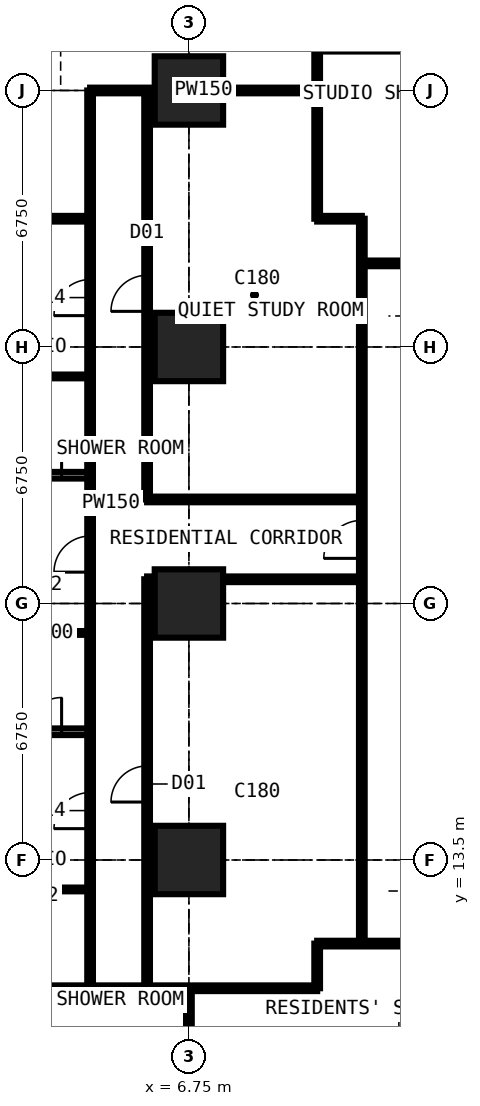
"""IFC4 building model, lengths in metres.
Left out: names, types, materials, properties, quantities, classifications, styles, units other than length and angle.
Written with IfcOpenShell. Run it as: python <this file> out.ifc"""

import sys

from ifc_helpers import new_model, si_unit, direction, frame, frame_2d, origin, origin_2d, place, context, subcontext, project, spatial, rectangle, extrude, element, fill, save


model = new_model("IFC4")
c1 = context("Model", 3, precision=1e-05, world=origin(), true_north=direction((0.0, 1.0)))
c2 = subcontext(c1, "Body", "Model", "MODEL_VIEW")
j1 = project(units=[si_unit("LENGTHUNIT", "METRE"), si_unit("PLANEANGLEUNIT", "RADIAN")], contexts=[c1])
p1 = place(None, origin())
s1 = spatial("IfcSite", under=j1, at=p1, CompositionType="ELEMENT")
p2 = place(p1, origin())
s2 = spatial("IfcBuilding", under=s1, at=p2, CompositionType="ELEMENT")
p3 = place(p2, frame((0.0, 0.0, 64.8)))
s3 = spatial("IfcBuildingStorey", under=s2, at=p3, CompositionType="ELEMENT", Elevation=64.8)
for number, where, z_axis, x_axis in (
    (1, (6.75, 13.5, 0.0), (0.0, 0.0, 1.0), (1.0, 0.0, 0.0)),
    (2, (6.75, 20.25, 0.0), (0.0, 0.0, 1.0), (1.0, 0.0, 0.0)),
    (3, (6.75, 27.0, 0.0), (0.0, 0.0, 1.0), (1.0, 0.0, 0.0)),
    (4, (6.75, 33.75, 0.0), (0.0, 0.0, 1.0), (1.0, 0.0, 0.0)),
):
    element("IfcColumn", number, at=place(p3, frame(where, z_axis=z_axis, x_axis=x_axis)), inside=s3, PredefinedType="COLUMN", context=c2, shape_type="SweptSolid", body=[
        extrude(rectangle(XDim=1.8, YDim=1.8, at=origin_2d()), origin(), (0.0, 0.0, 1.0), 3.6),
    ])
p4 = place(p3, frame((-0.734, 10.125, 0.0), z_axis=(0.0, 0.0, 1.0), x_axis=(1.0, 0.0, 0.0)))
e5 = element("IfcWall", 5, at=p4, inside=s3, PredefinedType="PARTITIONING", context=c2, shape_type="SweptSolid", body=[
    extrude(rectangle(XDim=10.859, YDim=0.15, at=frame_2d((5.429, 0.0))), origin(), (0.0, 0.0, 1.0), 3.375),
])
p5 = place(p3, frame((-0.734, 16.875, 0.0), z_axis=(0.0, 0.0, 1.0), x_axis=(1.0, 0.0, 0.0)))
e6 = element("IfcWall", 6, at=p5, inside=s3, PredefinedType="PARTITIONING", context=c2, shape_type="SweptSolid", body=[
    extrude(rectangle(XDim=4.884, YDim=0.175, at=frame_2d((2.442, 0.0))), origin(), (0.0, 0.0, 1.0), 3.375),
])
p6 = place(p5, frame((3.234, 0.0, 0.0)))
e7 = element("IfcOpeningElement", 7, at=p6, cuts=e6, PredefinedType="OPENING", context=c2, shape_type="SweptSolid", body=[
    extrude(rectangle(XDim=0.9, YDim=2.2, at=frame_2d((0.45, 1.1))), frame((0.0, 0.097, 0.0), z_axis=(0.0, -1.0, 0.0), x_axis=(1.0, 0.0, 0.0)), (0.0, 0.0, 1.0), 0.195),
])
p7 = place(p3, frame((-0.734, 23.625, 0.0), z_axis=(0.0, 0.0, 1.0), x_axis=(1.0, 0.0, 0.0)))
e8 = element("IfcWall", 8, at=p7, inside=s3, PredefinedType="PARTITIONING", context=c2, shape_type="SweptSolid", body=[
    extrude(rectangle(XDim=4.884, YDim=0.175, at=frame_2d((2.442, 0.0))), origin(), (0.0, 0.0, 1.0), 3.375),
])
p8 = place(p7, frame((3.234, 0.0, 0.0)))
e9 = element("IfcOpeningElement", 9, at=p8, cuts=e8, PredefinedType="OPENING", context=c2, shape_type="SweptSolid", body=[
    extrude(rectangle(XDim=0.9, YDim=2.2, at=frame_2d((0.45, 1.1))), frame((0.0, 0.097, 0.0), z_axis=(0.0, -1.0, 0.0), x_axis=(1.0, 0.0, 0.0)), (0.0, 0.0, 1.0), 0.195),
])
p9 = place(p3, frame((-0.734, 30.375, 0.0), z_axis=(0.0, 0.0, 1.0), x_axis=(1.0, 0.0, 0.0)))
e10 = element("IfcWall", 10, at=p9, inside=s3, PredefinedType="PARTITIONING", context=c2, shape_type="SweptSolid", body=[
    extrude(rectangle(XDim=4.884, YDim=0.15, at=frame_2d((2.442, 0.0))), origin(), (0.0, 0.0, 1.0), 3.375),
])
for number, where, z_axis, x_axis in (
    (11, (1.75, 12.725, 0.0), (0.0, 0.0, 1.0), (1.0, 0.0, 0.0)),
    (12, (1.75, 19.475, 0.0), (0.0, 0.0, 1.0), (1.0, 0.0, 0.0)),
    (13, (1.75, 26.225, 0.0), (0.0, 0.0, 1.0), (1.0, 0.0, 0.0)),
):
    element("IfcWall", number, at=place(p3, frame(where, z_axis=z_axis, x_axis=x_axis)), inside=s3, PredefinedType="PARTITIONING", context=c2, shape_type="SweptSolid", body=[
        extrude(rectangle(XDim=2.4, YDim=0.1, at=frame_2d((1.2, 0.0))), origin(), (0.0, 0.0, 1.0), 3.375),
    ])
p10 = place(p3, frame((4.15, 10.125, 0.0), z_axis=(0.0, 0.0, 1.0), x_axis=(0.0, 1.0, 0.0)))
e14 = element("IfcWall", 14, at=p10, inside=s3, PredefinedType="PARTITIONING", context=c2, shape_type="SweptSolid", body=[
    extrude(rectangle(XDim=23.625, YDim=0.15, at=frame_2d((11.812, 0.0))), origin(), (0.0, 0.0, 1.0), 3.375),
])
p11 = place(p10, frame((4.2, 0.0, 0.0)))
e15 = element("IfcOpeningElement", 15, at=p11, cuts=e14, PredefinedType="OPENING", context=c2, shape_type="SweptSolid", body=[
    extrude(rectangle(XDim=0.95, YDim=2.2, at=frame_2d((0.475, 1.1))), frame((0.0, 0.085, 0.0), z_axis=(0.0, -1.0, 0.0), x_axis=(1.0, 0.0, 0.0)), (0.0, 0.0, 1.0), 0.17),
])
p12 = place(p10, frame((10.95, 0.0, 0.0)))
e16 = element("IfcOpeningElement", 16, at=p12, cuts=e14, PredefinedType="OPENING", context=c2, shape_type="SweptSolid", body=[
    extrude(rectangle(XDim=0.95, YDim=2.2, at=frame_2d((0.475, 1.1))), frame((0.0, 0.085, 0.0), z_axis=(0.0, -1.0, 0.0), x_axis=(1.0, 0.0, 0.0)), (0.0, 0.0, 1.0), 0.17),
])
p13 = place(p10, frame((17.7, 0.0, 0.0)))
e17 = element("IfcOpeningElement", 17, at=p13, cuts=e14, PredefinedType="OPENING", context=c2, shape_type="SweptSolid", body=[
    extrude(rectangle(XDim=0.95, YDim=2.2, at=frame_2d((0.475, 1.1))), frame((0.0, 0.085, 0.0), z_axis=(0.0, -1.0, 0.0), x_axis=(1.0, 0.0, 0.0)), (0.0, 0.0, 1.0), 0.17),
])
p14 = place(p3, frame((4.15, 33.75, 0.0), z_axis=(0.0, 0.0, 1.0), x_axis=(1.0, 0.0, 0.0)))
e18 = element("IfcWall", 18, at=p14, inside=s3, PredefinedType="PARTITIONING", context=c2, shape_type="SweptSolid", body=[
    extrude(rectangle(XDim=5.975, YDim=0.15, at=frame_2d((2.988, 0.0))), origin(), (0.0, 0.0, 1.0), 2.877),
])
p15 = place(p3, frame((5.65, 10.125, 0.0), z_axis=(0.0, 0.0, 1.0), x_axis=(0.0, 1.0, 0.0)))
e19 = element("IfcWall", 19, at=p15, inside=s3, PredefinedType="PARTITIONING", context=c2, shape_type="SweptSolid", body=[
    extrude(rectangle(XDim=10.762, YDim=0.15, at=frame_2d((5.381, 0.0))), origin(), (0.0, 0.0, 1.0), 3.375),
])
p16 = place(p15, frame((4.9, 0.0, 0.0)))
e20 = element("IfcOpeningElement", 20, at=p16, cuts=e19, PredefinedType="OPENING", context=c2, shape_type="SweptSolid", body=[
    extrude(rectangle(XDim=0.95, YDim=2.2, at=frame_2d((0.475, 1.1))), frame((0.0, 0.085, 0.0), z_axis=(0.0, -1.0, 0.0), x_axis=(1.0, 0.0, 0.0)), (0.0, 0.0, 1.0), 0.17),
])
p17 = place(p3, frame((5.65, 20.887, 0.0), z_axis=(0.0, 0.0, 1.0), x_axis=(1.0, 0.0, 0.0)))
e21 = element("IfcWall", 21, at=p17, inside=s3, PredefinedType="PARTITIONING", context=c2, shape_type="SweptSolid", body=[
    extrude(rectangle(XDim=5.65, YDim=0.15, at=frame_2d((2.825, 0.0))), origin(), (0.0, 0.0, 1.0), 3.375),
])
p18 = place(p3, frame((5.65, 22.988, 0.0), z_axis=(0.0, 0.0, 1.0), x_axis=(0.0, 1.0, 0.0)))
e22 = element("IfcWall", 22, at=p18, inside=s3, PredefinedType="PARTITIONING", context=c2, shape_type="SweptSolid", body=[
    extrude(rectangle(XDim=10.762, YDim=0.15, at=frame_2d((5.381, 0.0))), origin(), (0.0, 0.0, 1.0), 3.375),
])
p19 = place(p18, frame((4.95, 0.0, 0.0)))
e23 = element("IfcOpeningElement", 23, at=p19, cuts=e22, PredefinedType="OPENING", context=c2, shape_type="SweptSolid", body=[
    extrude(rectangle(XDim=0.95, YDim=2.2, at=frame_2d((0.475, 1.1))), frame((0.0, 0.085, 0.0), z_axis=(0.0, -1.0, 0.0), x_axis=(1.0, 0.0, 0.0)), (0.0, 0.0, 1.0), 0.17),
])
p20 = place(p3, frame((5.65, 22.988, 0.0), z_axis=(0.0, 0.0, 1.0), x_axis=(1.0, 0.0, 0.0)))
e24 = element("IfcWall", 24, at=p20, inside=s3, PredefinedType="PARTITIONING", context=c2, shape_type="SweptSolid", body=[
    extrude(rectangle(XDim=5.65, YDim=0.15, at=frame_2d((2.825, 0.0))), origin(), (0.0, 0.0, 1.0), 3.375),
])
p21 = place(p3, frame((6.75, 4.15, 0.0), z_axis=(0.0, 0.0, 1.0), x_axis=(0.0, 1.0, 0.0)))
e25 = element("IfcWall", 25, at=p21, inside=s3, PredefinedType="PARTITIONING", context=c2, shape_type="SweptSolid", body=[
    extrude(rectangle(XDim=5.975, YDim=0.15, at=frame_2d((2.988, 0.0))), origin(), (0.0, 0.0, 1.0), 2.877),
])
p22 = place(p3, frame((10.125, 10.125, 0.0), z_axis=(0.0, 0.0, 1.0), x_axis=(0.0, 1.0, 0.0)))
e26 = element("IfcWall", 26, at=p22, inside=s3, PredefinedType="PARTITIONING", context=c2, shape_type="SweptSolid", body=[
    extrude(rectangle(XDim=1.175, YDim=0.15, at=frame_2d((0.587, 0.0))), origin(), (0.0, 0.0, 1.0), 3.375),
])
p23 = place(p3, frame((10.125, 11.3, 0.0), z_axis=(0.0, 0.0, 1.0), x_axis=(1.0, 0.0, 0.0)))
e27 = element("IfcWall", 27, at=p23, inside=s3, PredefinedType="PARTITIONING", context=c2, shape_type="SweptSolid", body=[
    extrude(rectangle(XDim=20.675, YDim=0.15, at=frame_2d((10.337, 0.0))), origin(), (0.0, 0.0, 1.0), 3.375),
])
p24 = place(p23, frame((8.375, 0.0, 0.0)))
e28 = element("IfcOpeningElement", 28, at=p24, cuts=e27, PredefinedType="OPENING", context=c2, shape_type="SweptSolid", body=[
    extrude(rectangle(XDim=1.0, YDim=2.2, at=frame_2d((0.5, 1.1))), frame((0.0, 0.085, 0.0), z_axis=(0.0, -1.0, 0.0), x_axis=(1.0, 0.0, 0.0)), (0.0, 0.0, 1.0), 0.17),
])
p25 = place(p23, frame((10.975, 0.0, 0.0)))
e29 = element("IfcOpeningElement", 29, at=p25, cuts=e27, PredefinedType="OPENING", context=c2, shape_type="SweptSolid", body=[
    extrude(rectangle(XDim=1.0, YDim=2.2, at=frame_2d((0.5, 1.1))), frame((0.0, 0.085, 0.0), z_axis=(0.0, -1.0, 0.0), x_axis=(1.0, 0.0, 0.0)), (0.0, 0.0, 1.0), 0.17),
])
p26 = place(p23, frame((3.925, 0.0, 0.0)))
e30 = element("IfcOpeningElement", 30, at=p26, cuts=e27, PredefinedType="OPENING", context=c2, shape_type="SweptSolid", body=[
    extrude(rectangle(XDim=0.95, YDim=2.2, at=frame_2d((0.475, 1.1))), frame((0.0, 0.085, 0.0), z_axis=(0.0, -1.0, 0.0), x_axis=(1.0, 0.0, 0.0)), (0.0, 0.0, 1.0), 0.17),
])
p27 = place(p3, frame((10.125, 30.375, 0.0), z_axis=(0.0, 0.0, 1.0), x_axis=(0.0, 1.0, 0.0)))
e31 = element("IfcWall", 31, at=p27, inside=s3, PredefinedType="PARTITIONING", context=c2, shape_type="SweptSolid", body=[
    extrude(rectangle(XDim=10.859, YDim=0.15, at=frame_2d((5.429, 0.0))), origin(), (0.0, 0.0, 1.0), 3.375),
])
p28 = place(p27, frame((4.725, 0.0, 0.0)))
e32 = element("IfcOpeningElement", 32, at=p28, cuts=e31, PredefinedType="OPENING", context=c2, shape_type="SweptSolid", body=[
    extrude(rectangle(XDim=1.0, YDim=2.2, at=frame_2d((0.5, 1.1))), frame((0.0, 0.085, 0.0), z_axis=(0.0, -1.0, 0.0), x_axis=(1.0, 0.0, 0.0)), (0.0, 0.0, 1.0), 0.17),
])
p29 = place(p3, frame((10.125, 30.375, 0.0), z_axis=(0.0, 0.0, 1.0), x_axis=(1.0, 0.0, 0.0)))
e33 = element("IfcWall", 33, at=p29, inside=s3, PredefinedType="PARTITIONING", context=c2, shape_type="SweptSolid", body=[
    extrude(rectangle(XDim=1.175, YDim=0.15, at=frame_2d((0.587, 0.0))), origin(), (0.0, 0.0, 1.0), 3.375),
])
p30 = place(p3, frame((11.3, 11.3, 0.0), z_axis=(0.0, 0.0, 1.0), x_axis=(0.0, 1.0, 0.0)))
e34 = element("IfcWall", 34, at=p30, inside=s3, PredefinedType="PARTITIONING", context=c2, shape_type="SweptSolid", body=[
    extrude(rectangle(XDim=19.075, YDim=0.15, at=frame_2d((9.538, 0.0))), origin(), (0.0, 0.0, 1.0), 3.375),
])
p31 = place(p30, frame((10.137, 0.0, 0.0)))
e35 = element("IfcOpeningElement", 35, at=p31, cuts=e34, PredefinedType="OPENING", context=c2, shape_type="SweptSolid", body=[
    extrude(rectangle(XDim=1.0, YDim=2.2, at=frame_2d((0.5, 1.1))), frame((0.0, 0.085, 0.0), z_axis=(0.0, -1.0, 0.0), x_axis=(1.0, 0.0, 0.0)), (0.0, 0.0, 1.0), 0.17),
])
p32 = place(p3, frame((11.3, 29.2, 0.0), z_axis=(0.0, 0.0, 1.0), x_axis=(1.0, 0.0, 0.0)))
e36 = element("IfcWall", 36, at=p32, inside=s3, PredefinedType="PARTITIONING", context=c2, shape_type="SweptSolid", body=[
    extrude(rectangle(XDim=19.075, YDim=0.15, at=frame_2d((9.538, 0.0))), origin(), (0.0, 0.0, 1.0), 3.375),
])
p33 = place(p32, frame((10.137, 0.0, 0.0)))
e37 = element("IfcOpeningElement", 37, at=p33, cuts=e36, PredefinedType="OPENING", context=c2, shape_type="SweptSolid", body=[
    extrude(rectangle(XDim=1.0, YDim=2.2, at=frame_2d((0.5, 1.1))), frame((0.0, 0.085, 0.0), z_axis=(0.0, -1.0, 0.0), x_axis=(1.0, 0.0, 0.0)), (0.0, 0.0, 1.0), 0.17),
])
p34 = place(p11, origin())
e38 = element("IfcDoor", 38, at=p34, inside=s3, OperationType="SINGLE_SWING_LEFT", PredefinedType="DOOR", context=c2, shape_type="SweptSolid", body=[
    extrude(rectangle(XDim=0.95, YDim=2.2, at=frame_2d((0.475, 1.1))), frame((0.0, 0.025, 0.0), z_axis=(0.0, -1.0, 0.0), x_axis=(1.0, 0.0, 0.0)), (0.0, 0.0, 1.0), 0.05),
])
fill(e15, e38)
p35 = place(p12, origin())
e39 = element("IfcDoor", 39, at=p35, inside=s3, OperationType="SINGLE_SWING_LEFT", PredefinedType="DOOR", context=c2, shape_type="SweptSolid", body=[
    extrude(rectangle(XDim=0.95, YDim=2.2, at=frame_2d((0.475, 1.1))), frame((0.0, 0.025, 0.0), z_axis=(0.0, -1.0, 0.0), x_axis=(1.0, 0.0, 0.0)), (0.0, 0.0, 1.0), 0.05),
])
fill(e16, e39)
p36 = place(p6, origin())
e40 = element("IfcDoor", 40, at=p36, inside=s3, OperationType="SINGLE_SWING_RIGHT", PredefinedType="DOOR", context=c2, shape_type="SweptSolid", body=[
    extrude(rectangle(XDim=0.9, YDim=2.2, at=frame_2d((0.45, 1.1))), frame((0.0, 0.025, 0.0), z_axis=(0.0, -1.0, 0.0), x_axis=(1.0, 0.0, 0.0)), (0.0, 0.0, 1.0), 0.05),
])
fill(e7, e40)
p37 = place(p13, origin())
e41 = element("IfcDoor", 41, at=p37, inside=s3, OperationType="SINGLE_SWING_LEFT", PredefinedType="DOOR", context=c2, shape_type="SweptSolid", body=[
    extrude(rectangle(XDim=0.95, YDim=2.2, at=frame_2d((0.475, 1.1))), frame((0.0, 0.025, 0.0), z_axis=(0.0, -1.0, 0.0), x_axis=(1.0, 0.0, 0.0)), (0.0, 0.0, 1.0), 0.05),
])
fill(e17, e41)
p38 = place(p8, origin())
e42 = element("IfcDoor", 42, at=p38, inside=s3, OperationType="SINGLE_SWING_RIGHT", PredefinedType="DOOR", context=c2, shape_type="SweptSolid", body=[
    extrude(rectangle(XDim=0.9, YDim=2.2, at=frame_2d((0.45, 1.1))), frame((0.0, 0.025, 0.0), z_axis=(0.0, -1.0, 0.0), x_axis=(1.0, 0.0, 0.0)), (0.0, 0.0, 1.0), 0.05),
])
fill(e9, e42)
p39 = place(p31, origin())
e43 = element("IfcDoor", 43, at=p39, inside=s3, OperationType="SINGLE_SWING_LEFT", PredefinedType="DOOR", context=c2, shape_type="SweptSolid", body=[
    extrude(rectangle(XDim=1.0, YDim=2.2, at=frame_2d((0.5, 1.1))), frame((0.0, 0.025, 0.0), z_axis=(0.0, -1.0, 0.0), x_axis=(1.0, 0.0, 0.0)), (0.0, 0.0, 1.0), 0.05),
])
fill(e35, e43)
p40 = place(p16, origin())
e44 = element("IfcDoor", 44, at=p40, inside=s3, OperationType="SINGLE_SWING_LEFT", PredefinedType="DOOR", context=c2, shape_type="SweptSolid", body=[
    extrude(rectangle(XDim=0.95, YDim=2.2, at=frame_2d((0.475, 1.1))), frame((0.0, 0.025, 0.0), z_axis=(0.0, -1.0, 0.0), x_axis=(1.0, 0.0, 0.0)), (0.0, 0.0, 1.0), 0.05),
])
fill(e20, e44)
p41 = place(p19, origin())
e45 = element("IfcDoor", 45, at=p41, inside=s3, OperationType="SINGLE_SWING_LEFT", PredefinedType="DOOR", context=c2, shape_type="SweptSolid", body=[
    extrude(rectangle(XDim=0.95, YDim=2.2, at=frame_2d((0.475, 1.1))), frame((0.0, 0.025, 0.0), z_axis=(0.0, -1.0, 0.0), x_axis=(1.0, 0.0, 0.0)), (0.0, 0.0, 1.0), 0.05),
])
fill(e23, e45)
save(model, sys.argv[1])
